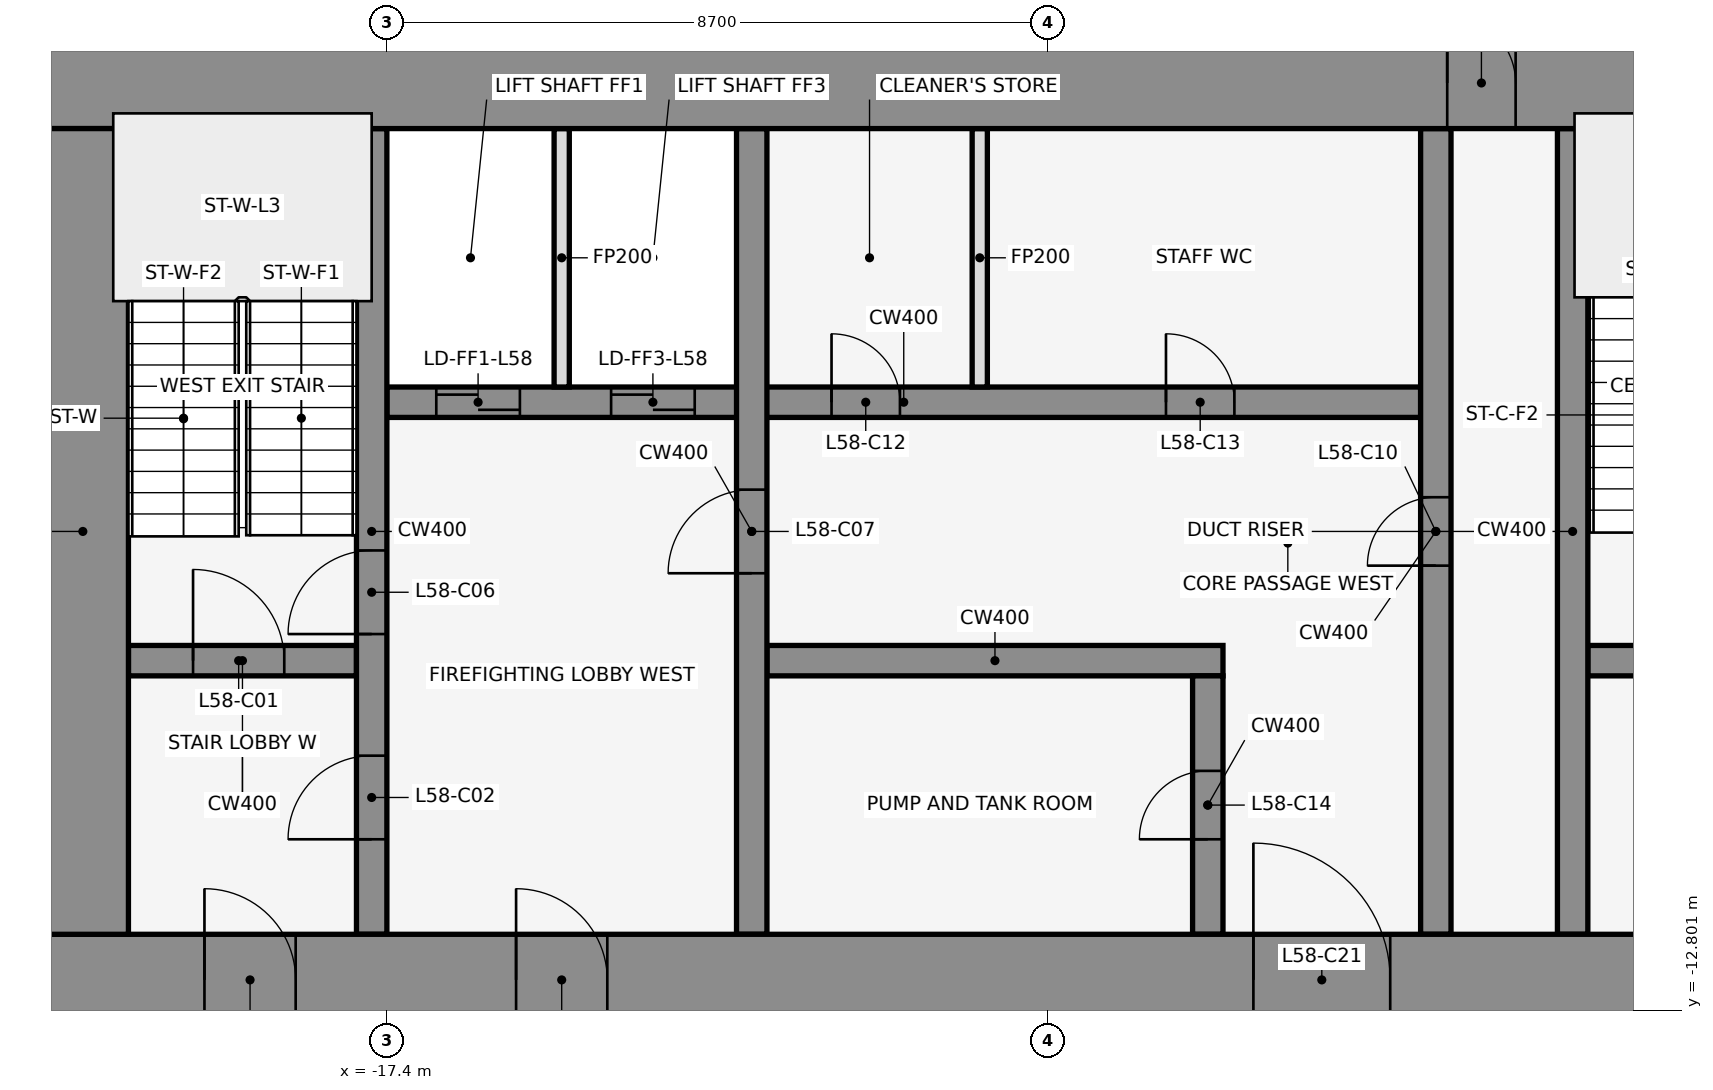
"""IFC4 building model, lengths in metres.
Left out: names, types, materials, properties, quantities, classifications, styles, units other than length and angle.
Written with IfcOpenShell. Run it as: python <this file> out.ifc"""

import sys

from ifc_helpers import new_model, si_unit, direction, frame, frame_2d, origin, place, context, subcontext, project, spatial, rectangle, extrude, element, fill, save


model = new_model("IFC4")
c1 = context("Model", 3, precision=1e-05, world=origin(), true_north=direction((0.0, 1.0)))
c2 = subcontext(c1, "Body", "Model", "MODEL_VIEW")
j1 = project(units=[si_unit("LENGTHUNIT", "METRE"), si_unit("PLANEANGLEUNIT", "RADIAN")], contexts=[c1])
p1 = place(None, origin())
s1 = spatial("IfcSite", under=j1, at=p1, CompositionType="ELEMENT")
p2 = place(p1, origin())
s2 = spatial("IfcBuilding", under=s1, at=p2, CompositionType="ELEMENT")
p3 = place(p2, frame((0.0, 0.0, 258.2)))
s3 = spatial("IfcBuildingStorey", under=s2, at=p3, CompositionType="ELEMENT", Elevation=258.2)
for number, where, z_axis, x_axis in (
    (1, (-0.068, -0.105, 0.0), (0.0, 0.0, 1.0), (-0.84, 0.543, 0.0)),
    (2, (-14.599, 1.08, 0.0), (0.0, 0.0, 1.0), (-0.84, -0.543, 0.0)),
):
    element("IfcWall", number, at=place(p3, frame(where, z_axis=z_axis, x_axis=x_axis)), inside=s3, PredefinedType="STANDARD", context=c2, shape_type="SweptSolid", body=[
        extrude(rectangle(XDim=2.183, YDim=0.25, at=frame_2d((1.091, 0.0))), origin(), (0.0, 0.0, 1.0), 4.05),
    ])
p4 = place(p3, frame((-20.8, -8.2, 0.0), z_axis=(0.0, 0.0, 1.0), x_axis=(1.0, 0.0, 0.0)))
e3 = element("IfcWall", 3, at=p4, inside=s3, PredefinedType="SHEAR", context=c2, shape_type="SweptSolid", body=[
    extrude(rectangle(XDim=3.0, YDim=0.4, at=frame_2d((1.5, 0.0))), origin(), (0.0, 0.0, 1.0), 4.2),
])
p5 = place(p4, frame((0.85, 0.0, 0.0)))
e4 = element("IfcOpeningElement", 4, at=p5, cuts=e3, PredefinedType="OPENING", context=c2, shape_type="SweptSolid", body=[
    extrude(rectangle(XDim=1.2, YDim=2.1, at=frame_2d((0.6, 1.05))), frame((0.0, 0.212, 0.0), z_axis=(0.0, -1.0, 0.0), x_axis=(1.0, 0.0, 0.0)), (0.0, 0.0, 1.0), 0.424),
])
p6 = place(p3, frame((-12.4, -8.2, 0.0), z_axis=(0.0, 0.0, 1.0), x_axis=(1.0, 0.0, 0.0)))
e5 = element("IfcWall", 5, at=p6, inside=s3, PredefinedType="SHEAR", context=c2, shape_type="SweptSolid", body=[
    extrude(rectangle(XDim=6.0, YDim=0.4, at=frame_2d((3.0, 0.0))), origin(), (0.0, 0.0, 1.0), 4.2),
])
p7 = place(p3, frame((-1.6, -8.2, 0.0), z_axis=(0.0, 0.0, 1.0), x_axis=(1.0, 0.0, 0.0)))
e6 = element("IfcWall", 6, at=p7, inside=s3, PredefinedType="SHEAR", context=c2, shape_type="SweptSolid", body=[
    extrude(rectangle(XDim=3.2, YDim=0.4, at=frame_2d((1.6, 0.0))), origin(), (0.0, 0.0, 1.0), 4.2),
])
p8 = place(p7, frame((1.05, 0.0, 0.0)))
e7 = element("IfcOpeningElement", 7, at=p8, cuts=e6, PredefinedType="OPENING", context=c2, shape_type="SweptSolid", body=[
    extrude(rectangle(XDim=1.2, YDim=2.1, at=frame_2d((0.6, 1.05))), frame((0.0, 0.212, 0.0), z_axis=(0.0, -1.0, 0.0), x_axis=(1.0, 0.0, 0.0)), (0.0, 0.0, 1.0), 0.424),
])
p9 = place(p3, frame((-17.4, -4.8, 0.0), z_axis=(0.0, 0.0, 1.0), x_axis=(1.0, 0.0, 0.0)))
e8 = element("IfcWall", 8, at=p9, inside=s3, PredefinedType="SHEAR", context=c2, shape_type="SweptSolid", body=[
    extrude(rectangle(XDim=13.6, YDim=0.4, at=frame_2d((6.8, 0.0))), origin(), (0.0, 0.0, 1.0), 4.2),
])
p10 = place(p9, frame((0.65, 0.0, 0.0)))
e9 = element("IfcOpeningElement", 9, at=p10, cuts=e8, PredefinedType="OPENING", context=c2, shape_type="SweptSolid", body=[
    extrude(rectangle(XDim=1.1, YDim=2.1, at=frame_2d((0.55, 1.05))), frame((0.0, 0.212, 0.0), z_axis=(0.0, -1.0, 0.0), x_axis=(1.0, 0.0, 0.0)), (0.0, 0.0, 1.0), 0.424),
])
p11 = place(p9, frame((2.95, 0.0, 0.0)))
e10 = element("IfcOpeningElement", 10, at=p11, cuts=e8, PredefinedType="OPENING", context=c2, shape_type="SweptSolid", body=[
    extrude(rectangle(XDim=1.1, YDim=2.1, at=frame_2d((0.55, 1.05))), frame((0.0, 0.212, 0.0), z_axis=(0.0, -1.0, 0.0), x_axis=(1.0, 0.0, 0.0)), (0.0, 0.0, 1.0), 0.424),
])
p12 = place(p9, frame((5.85, 0.0, 0.0)))
e11 = element("IfcOpeningElement", 11, at=p12, cuts=e8, PredefinedType="OPENING", context=c2, shape_type="SweptSolid", body=[
    extrude(rectangle(XDim=0.9, YDim=2.1, at=frame_2d((0.45, 1.05))), frame((0.0, 0.212, 0.0), z_axis=(0.0, -1.0, 0.0), x_axis=(1.0, 0.0, 0.0)), (0.0, 0.0, 1.0), 0.424),
])
p13 = place(p9, frame((10.25, 0.0, 0.0)))
e12 = element("IfcOpeningElement", 12, at=p13, cuts=e8, PredefinedType="OPENING", context=c2, shape_type="SweptSolid", body=[
    extrude(rectangle(XDim=0.9, YDim=2.1, at=frame_2d((0.45, 1.05))), frame((0.0, 0.212, 0.0), z_axis=(0.0, -1.0, 0.0), x_axis=(1.0, 0.0, 0.0)), (0.0, 0.0, 1.0), 0.424),
])
p14 = place(p3, frame((-17.6, -11.8, 0.0), z_axis=(0.0, 0.0, 1.0), x_axis=(0.0, 1.0, 0.0)))
e13 = element("IfcWall", 13, at=p14, inside=s3, PredefinedType="SHEAR", context=c2, shape_type="SweptSolid", body=[
    extrude(rectangle(XDim=10.6, YDim=0.4, at=frame_2d((5.3, 0.0))), origin(), (0.0, 0.0, 1.0), 4.2),
])
p15 = place(p14, frame((1.25, 0.0, 0.0)))
e14 = element("IfcOpeningElement", 14, at=p15, cuts=e13, PredefinedType="OPENING", context=c2, shape_type="SweptSolid", body=[
    extrude(rectangle(XDim=1.1, YDim=2.1, at=frame_2d((0.55, 1.05))), frame((0.0, 0.212, 0.0), z_axis=(0.0, -1.0, 0.0), x_axis=(1.0, 0.0, 0.0)), (0.0, 0.0, 1.0), 0.424),
])
p16 = place(p14, frame((3.95, 0.0, 0.0)))
e15 = element("IfcOpeningElement", 15, at=p16, cuts=e13, PredefinedType="OPENING", context=c2, shape_type="SweptSolid", body=[
    extrude(rectangle(XDim=1.1, YDim=2.1, at=frame_2d((0.55, 1.05))), frame((0.0, 0.212, 0.0), z_axis=(0.0, -1.0, 0.0), x_axis=(1.0, 0.0, 0.0)), (0.0, 0.0, 1.0), 0.424),
])
p17 = place(p3, frame((-15.1, -4.6, 0.0), z_axis=(0.0, 0.0, 1.0), x_axis=(0.0, 1.0, 0.0)))
e16 = element("IfcWall", 16, at=p17, inside=s3, PredefinedType="PARTITIONING", context=c2, shape_type="SweptSolid", body=[
    extrude(rectangle(XDim=3.4, YDim=0.2, at=frame_2d((1.7, 0.0))), origin(), (0.0, 0.0, 1.0), 3.118),
])
p18 = place(p3, frame((-12.6, -11.8, 0.0), z_axis=(0.0, 0.0, 1.0), x_axis=(0.0, 1.0, 0.0)))
e17 = element("IfcWall", 17, at=p18, inside=s3, PredefinedType="SHEAR", context=c2, shape_type="SweptSolid", body=[
    extrude(rectangle(XDim=10.6, YDim=0.4, at=frame_2d((5.3, 0.0))), origin(), (0.0, 0.0, 1.0), 4.2),
])
p19 = place(p18, frame((4.75, 0.0, 0.0)))
e18 = element("IfcOpeningElement", 18, at=p19, cuts=e17, PredefinedType="OPENING", context=c2, shape_type="SweptSolid", body=[
    extrude(rectangle(XDim=1.1, YDim=2.1, at=frame_2d((0.55, 1.05))), frame((0.0, 0.212, 0.0), z_axis=(0.0, -1.0, 0.0), x_axis=(1.0, 0.0, 0.0)), (0.0, 0.0, 1.0), 0.424),
])
p20 = place(p3, frame((-9.6, -4.6, 0.0), z_axis=(0.0, 0.0, 1.0), x_axis=(0.0, 1.0, 0.0)))
e19 = element("IfcWall", 19, at=p20, inside=s3, PredefinedType="PARTITIONING", context=c2, shape_type="SweptSolid", body=[
    extrude(rectangle(XDim=3.4, YDim=0.2, at=frame_2d((1.7, 0.0))), origin(), (0.0, 0.0, 1.0), 3.118),
])
p21 = place(p3, frame((-6.6, -11.8, 0.0), z_axis=(0.0, 0.0, 1.0), x_axis=(0.0, 1.0, 0.0)))
e20 = element("IfcWall", 20, at=p21, inside=s3, PredefinedType="SHEAR", context=c2, shape_type="SweptSolid", body=[
    extrude(rectangle(XDim=3.4, YDim=0.4, at=frame_2d((1.7, 0.0))), origin(), (0.0, 0.0, 1.0), 4.2),
])
p22 = place(p21, frame((1.25, 0.0, 0.0)))
e21 = element("IfcOpeningElement", 21, at=p22, cuts=e20, PredefinedType="OPENING", context=c2, shape_type="SweptSolid", body=[
    extrude(rectangle(XDim=0.9, YDim=2.1, at=frame_2d((0.45, 1.05))), frame((0.0, 0.212, 0.0), z_axis=(0.0, -1.0, 0.0), x_axis=(1.0, 0.0, 0.0)), (0.0, 0.0, 1.0), 0.424),
])
p23 = place(p3, frame((-3.6, -11.8, 0.0), z_axis=(0.0, 0.0, 1.0), x_axis=(0.0, 1.0, 0.0)))
e22 = element("IfcWall", 22, at=p23, inside=s3, PredefinedType="SHEAR", context=c2, shape_type="SweptSolid", body=[
    extrude(rectangle(XDim=10.6, YDim=0.4, at=frame_2d((5.3, 0.0))), origin(), (0.0, 0.0, 1.0), 4.2),
])
p24 = place(p23, frame((4.85, 0.0, 0.0)))
e23 = element("IfcOpeningElement", 23, at=p24, cuts=e22, PredefinedType="OPENING", context=c2, shape_type="SweptSolid", body=[
    extrude(rectangle(XDim=0.9, YDim=2.1, at=frame_2d((0.45, 1.05))), frame((0.0, 0.212, 0.0), z_axis=(0.0, -1.0, 0.0), x_axis=(1.0, 0.0, 0.0)), (0.0, 0.0, 1.0), 0.424),
])
p25 = place(p3, frame((-1.8, -11.8, 0.0), z_axis=(0.0, 0.0, 1.0), x_axis=(0.0, 1.0, 0.0)))
e24 = element("IfcWall", 24, at=p25, inside=s3, PredefinedType="SHEAR", context=c2, shape_type="SweptSolid", body=[
    extrude(rectangle(XDim=10.6, YDim=0.4, at=frame_2d((5.3, 0.0))), origin(), (0.0, 0.0, 1.0), 4.2),
])
p26 = place(p3, frame((-22.0, -0.6, 0.0), z_axis=(0.0, 0.0, 1.0), x_axis=(1.0, 0.0, 0.0)))
e25 = element("IfcWall", 25, at=p26, inside=s3, PredefinedType="SHEAR", context=c2, shape_type="SweptSolid", body=[
    extrude(rectangle(XDim=44.0, YDim=1.2, at=frame_2d((22.0, 0.0))), origin(), (0.0, 0.0, 1.0), 4.2),
])
p27 = place(p26, frame((18.55, 0.0, 0.0)))
e26 = element("IfcOpeningElement", 26, at=p27, cuts=e25, PredefinedType="OPENING", context=c2, shape_type="SweptSolid", body=[
    extrude(rectangle(XDim=0.9, YDim=2.1, at=frame_2d((0.45, 1.05))), frame((0.0, 0.612, 0.0), z_axis=(0.0, -1.0, 0.0), x_axis=(1.0, 0.0, 0.0)), (0.0, 0.0, 1.0), 1.224),
])
p28 = place(p26, frame((24.55, 0.0, 0.0)))
e27 = element("IfcOpeningElement", 27, at=p28, cuts=e25, PredefinedType="OPENING", context=c2, shape_type="SweptSolid", body=[
    extrude(rectangle(XDim=0.9, YDim=2.1, at=frame_2d((0.45, 1.05))), frame((0.0, 0.612, 0.0), z_axis=(0.0, -1.0, 0.0), x_axis=(1.0, 0.0, 0.0)), (0.0, 0.0, 1.0), 1.224),
])
p29 = place(p3, frame((-22.0, -12.4, 0.0), z_axis=(0.0, 0.0, 1.0), x_axis=(1.0, 0.0, 0.0)))
e28 = element("IfcWall", 28, at=p29, inside=s3, PredefinedType="SHEAR", context=c2, shape_type="SweptSolid", body=[
    extrude(rectangle(XDim=44.0, YDim=1.2, at=frame_2d((22.0, 0.0))), origin(), (0.0, 0.0, 1.0), 4.2),
])
p30 = place(p29, frame((2.2, 0.0, 0.0)))
e29 = element("IfcOpeningElement", 29, at=p30, cuts=e28, PredefinedType="OPENING", context=c2, shape_type="SweptSolid", body=[
    extrude(rectangle(XDim=1.2, YDim=2.1, at=frame_2d((0.6, 1.05))), frame((0.0, 0.612, 0.0), z_axis=(0.0, -1.0, 0.0), x_axis=(1.0, 0.0, 0.0)), (0.0, 0.0, 1.0), 1.224),
])
p31 = place(p29, frame((21.4, 0.0, 0.0)))
e30 = element("IfcOpeningElement", 30, at=p31, cuts=e28, PredefinedType="OPENING", context=c2, shape_type="SweptSolid", body=[
    extrude(rectangle(XDim=1.2, YDim=2.1, at=frame_2d((0.6, 1.05))), frame((0.0, 0.612, 0.0), z_axis=(0.0, -1.0, 0.0), x_axis=(1.0, 0.0, 0.0)), (0.0, 0.0, 1.0), 1.224),
])
p32 = place(p29, frame((40.6, 0.0, 0.0)))
e31 = element("IfcOpeningElement", 31, at=p32, cuts=e28, PredefinedType="OPENING", context=c2, shape_type="SweptSolid", body=[
    extrude(rectangle(XDim=1.2, YDim=2.1, at=frame_2d((0.6, 1.05))), frame((0.0, 0.612, 0.0), z_axis=(0.0, -1.0, 0.0), x_axis=(1.0, 0.0, 0.0)), (0.0, 0.0, 1.0), 1.224),
])
p33 = place(p29, frame((16.0, 0.0, 0.0)))
e32 = element("IfcOpeningElement", 32, at=p33, cuts=e28, PredefinedType="OPENING", context=c2, shape_type="SweptSolid", body=[
    extrude(rectangle(XDim=1.8, YDim=2.1, at=frame_2d((0.9, 1.05))), frame((0.0, 0.612, 0.0), z_axis=(0.0, -1.0, 0.0), x_axis=(1.0, 0.0, 0.0)), (0.0, 0.0, 1.0), 1.224),
])
p34 = place(p29, frame((6.3, 0.0, 0.0)))
e33 = element("IfcOpeningElement", 33, at=p34, cuts=e28, PredefinedType="OPENING", context=c2, shape_type="SweptSolid", body=[
    extrude(rectangle(XDim=1.2, YDim=2.1, at=frame_2d((0.6, 1.05))), frame((0.0, 0.612, 0.0), z_axis=(0.0, -1.0, 0.0), x_axis=(1.0, 0.0, 0.0)), (0.0, 0.0, 1.0), 1.224),
])
p35 = place(p29, frame((26.2, 0.0, 0.0)))
e34 = element("IfcOpeningElement", 34, at=p35, cuts=e28, PredefinedType="OPENING", context=c2, shape_type="SweptSolid", body=[
    extrude(rectangle(XDim=1.8, YDim=2.1, at=frame_2d((0.9, 1.05))), frame((0.0, 0.612, 0.0), z_axis=(0.0, -1.0, 0.0), x_axis=(1.0, 0.0, 0.0)), (0.0, 0.0, 1.0), 1.224),
])
p36 = place(p29, frame((36.5, 0.0, 0.0)))
e35 = element("IfcOpeningElement", 35, at=p36, cuts=e28, PredefinedType="OPENING", context=c2, shape_type="SweptSolid", body=[
    extrude(rectangle(XDim=1.2, YDim=2.1, at=frame_2d((0.6, 1.05))), frame((0.0, 0.612, 0.0), z_axis=(0.0, -1.0, 0.0), x_axis=(1.0, 0.0, 0.0)), (0.0, 0.0, 1.0), 1.224),
])
p37 = place(p3, frame((-21.4, -11.8, 0.0), z_axis=(0.0, 0.0, 1.0), x_axis=(0.0, 1.0, 0.0)))
e36 = element("IfcWall", 36, at=p37, inside=s3, PredefinedType="SHEAR", context=c2, shape_type="SweptSolid", body=[
    extrude(rectangle(XDim=10.6, YDim=1.2, at=frame_2d((5.3, 0.0))), origin(), (0.0, 0.0, 1.0), 4.2),
])
p38 = place(p5, origin())
e37 = element("IfcDoor", 37, at=p38, inside=s3, OperationType="SINGLE_SWING_LEFT", PredefinedType="DOOR", context=c2, shape_type="SweptSolid", body=[
    extrude(rectangle(XDim=1.2, YDim=2.1, at=frame_2d((0.6, 1.05))), frame((0.0, 0.025, 0.0), z_axis=(0.0, -1.0, 0.0), x_axis=(1.0, 0.0, 0.0)), (0.0, 0.0, 1.0), 0.05),
])
fill(e4, e37)
p39 = place(p15, frame((1.1, 0.0, 0.0), z_axis=(0.0, 0.0, 1.0), x_axis=(-1.0, 0.0, 0.0)))
e38 = element("IfcDoor", 38, at=p39, inside=s3, OperationType="SINGLE_SWING_LEFT", PredefinedType="DOOR", context=c2, shape_type="SweptSolid", body=[
    extrude(rectangle(XDim=1.1, YDim=2.1, at=frame_2d((0.55, 1.05))), frame((0.0, 0.025, 0.0), z_axis=(0.0, -1.0, 0.0), x_axis=(1.0, 0.0, 0.0)), (0.0, 0.0, 1.0), 0.05),
])
fill(e14, e38)
p40 = place(p10, origin())
e39 = element("IfcDoor", 39, at=p40, inside=s3, OperationType="DOUBLE_DOOR_SLIDING", PredefinedType="DOOR", context=c2, shape_type="SweptSolid", body=[
    extrude(rectangle(XDim=1.1, YDim=2.1, at=frame_2d((0.55, 1.05))), frame((0.0, 0.025, 0.0), z_axis=(0.0, -1.0, 0.0), x_axis=(1.0, 0.0, 0.0)), (0.0, 0.0, 1.0), 0.05),
])
fill(e9, e39)
p41 = place(p11, origin())
e40 = element("IfcDoor", 40, at=p41, inside=s3, OperationType="DOUBLE_DOOR_SLIDING", PredefinedType="DOOR", context=c2, shape_type="SweptSolid", body=[
    extrude(rectangle(XDim=1.1, YDim=2.1, at=frame_2d((0.55, 1.05))), frame((0.0, 0.025, 0.0), z_axis=(0.0, -1.0, 0.0), x_axis=(1.0, 0.0, 0.0)), (0.0, 0.0, 1.0), 0.05),
])
fill(e10, e40)
p42 = place(p16, frame((1.1, 0.0, 0.0), z_axis=(0.0, 0.0, 1.0), x_axis=(-1.0, 0.0, 0.0)))
e41 = element("IfcDoor", 41, at=p42, inside=s3, OperationType="SINGLE_SWING_LEFT", PredefinedType="DOOR", context=c2, shape_type="SweptSolid", body=[
    extrude(rectangle(XDim=1.1, YDim=2.1, at=frame_2d((0.55, 1.05))), frame((0.0, 0.025, 0.0), z_axis=(0.0, -1.0, 0.0), x_axis=(1.0, 0.0, 0.0)), (0.0, 0.0, 1.0), 0.05),
])
fill(e15, e41)
p43 = place(p19, origin())
e42 = element("IfcDoor", 42, at=p43, inside=s3, OperationType="SINGLE_SWING_LEFT", PredefinedType="DOOR", context=c2, shape_type="SweptSolid", body=[
    extrude(rectangle(XDim=1.1, YDim=2.1, at=frame_2d((0.55, 1.05))), frame((0.0, 0.025, 0.0), z_axis=(0.0, -1.0, 0.0), x_axis=(1.0, 0.0, 0.0)), (0.0, 0.0, 1.0), 0.05),
])
fill(e18, e42)
p44 = place(p24, frame((0.9, 0.0, 0.0), z_axis=(0.0, 0.0, 1.0), x_axis=(-1.0, 0.0, 0.0)))
e43 = element("IfcDoor", 43, at=p44, inside=s3, OperationType="SINGLE_SWING_LEFT", PredefinedType="DOOR", context=c2, shape_type="SweptSolid", body=[
    extrude(rectangle(XDim=0.9, YDim=2.1, at=frame_2d((0.45, 1.05))), frame((0.0, 0.025, 0.0), z_axis=(0.0, -1.0, 0.0), x_axis=(1.0, 0.0, 0.0)), (0.0, 0.0, 1.0), 0.05),
])
fill(e23, e43)
p45 = place(p12, origin())
e44 = element("IfcDoor", 44, at=p45, inside=s3, OperationType="SINGLE_SWING_RIGHT", PredefinedType="DOOR", context=c2, shape_type="SweptSolid", body=[
    extrude(rectangle(XDim=0.9, YDim=2.1, at=frame_2d((0.45, 1.05))), frame((0.0, 0.025, 0.0), z_axis=(0.0, -1.0, 0.0), x_axis=(1.0, 0.0, 0.0)), (0.0, 0.0, 1.0), 0.05),
])
fill(e11, e44)
p46 = place(p13, origin())
e45 = element("IfcDoor", 45, at=p46, inside=s3, OperationType="SINGLE_SWING_LEFT", PredefinedType="DOOR", context=c2, shape_type="SweptSolid", body=[
    extrude(rectangle(XDim=0.9, YDim=2.1, at=frame_2d((0.45, 1.05))), frame((0.0, 0.025, 0.0), z_axis=(0.0, -1.0, 0.0), x_axis=(1.0, 0.0, 0.0)), (0.0, 0.0, 1.0), 0.05),
])
fill(e12, e45)
p47 = place(p22, origin())
e46 = element("IfcDoor", 46, at=p47, inside=s3, OperationType="SINGLE_SWING_RIGHT", PredefinedType="DOOR", context=c2, shape_type="SweptSolid", body=[
    extrude(rectangle(XDim=0.9, YDim=2.1, at=frame_2d((0.45, 1.05))), frame((0.0, 0.025, 0.0), z_axis=(0.0, -1.0, 0.0), x_axis=(1.0, 0.0, 0.0)), (0.0, 0.0, 1.0), 0.05),
])
fill(e21, e46)
p48 = place(p27, origin())
e47 = element("IfcDoor", 47, at=p48, inside=s3, OperationType="SINGLE_SWING_LEFT", PredefinedType="DOOR", context=c2, shape_type="SweptSolid", body=[
    extrude(rectangle(XDim=0.9, YDim=2.1, at=frame_2d((0.45, 1.05))), frame((0.0, 0.025, 0.0), z_axis=(0.0, -1.0, 0.0), x_axis=(1.0, 0.0, 0.0)), (0.0, 0.0, 1.0), 0.05),
])
fill(e26, e47)
p49 = place(p30, frame((1.2, 0.0, 0.0), z_axis=(0.0, 0.0, 1.0), x_axis=(-1.0, 0.0, 0.0)))
e48 = element("IfcDoor", 48, at=p49, inside=s3, OperationType="SINGLE_SWING_RIGHT", PredefinedType="DOOR", context=c2, shape_type="SweptSolid", body=[
    extrude(rectangle(XDim=1.2, YDim=2.1, at=frame_2d((0.6, 1.05))), frame((0.0, 0.025, 0.0), z_axis=(0.0, -1.0, 0.0), x_axis=(1.0, 0.0, 0.0)), (0.0, 0.0, 1.0), 0.05),
])
fill(e29, e48)
p50 = place(p33, origin())
e49 = element("IfcDoor", 49, at=p50, inside=s3, OperationType="SINGLE_SWING_LEFT", PredefinedType="DOOR", context=c2, shape_type="SweptSolid", body=[
    extrude(rectangle(XDim=1.8, YDim=2.1, at=frame_2d((0.9, 1.05))), frame((0.0, 0.025, 0.0), z_axis=(0.0, -1.0, 0.0), x_axis=(1.0, 0.0, 0.0)), (0.0, 0.0, 1.0), 0.05),
])
fill(e32, e49)
p51 = place(p34, frame((1.2, 0.0, 0.0), z_axis=(0.0, 0.0, 1.0), x_axis=(-1.0, 0.0, 0.0)))
e50 = element("IfcDoor", 50, at=p51, inside=s3, OperationType="SINGLE_SWING_RIGHT", PredefinedType="DOOR", context=c2, shape_type="SweptSolid", body=[
    extrude(rectangle(XDim=1.2, YDim=2.1, at=frame_2d((0.6, 1.05))), frame((0.0, 0.025, 0.0), z_axis=(0.0, -1.0, 0.0), x_axis=(1.0, 0.0, 0.0)), (0.0, 0.0, 1.0), 0.05),
])
fill(e33, e50)
save(model, sys.argv[1])
